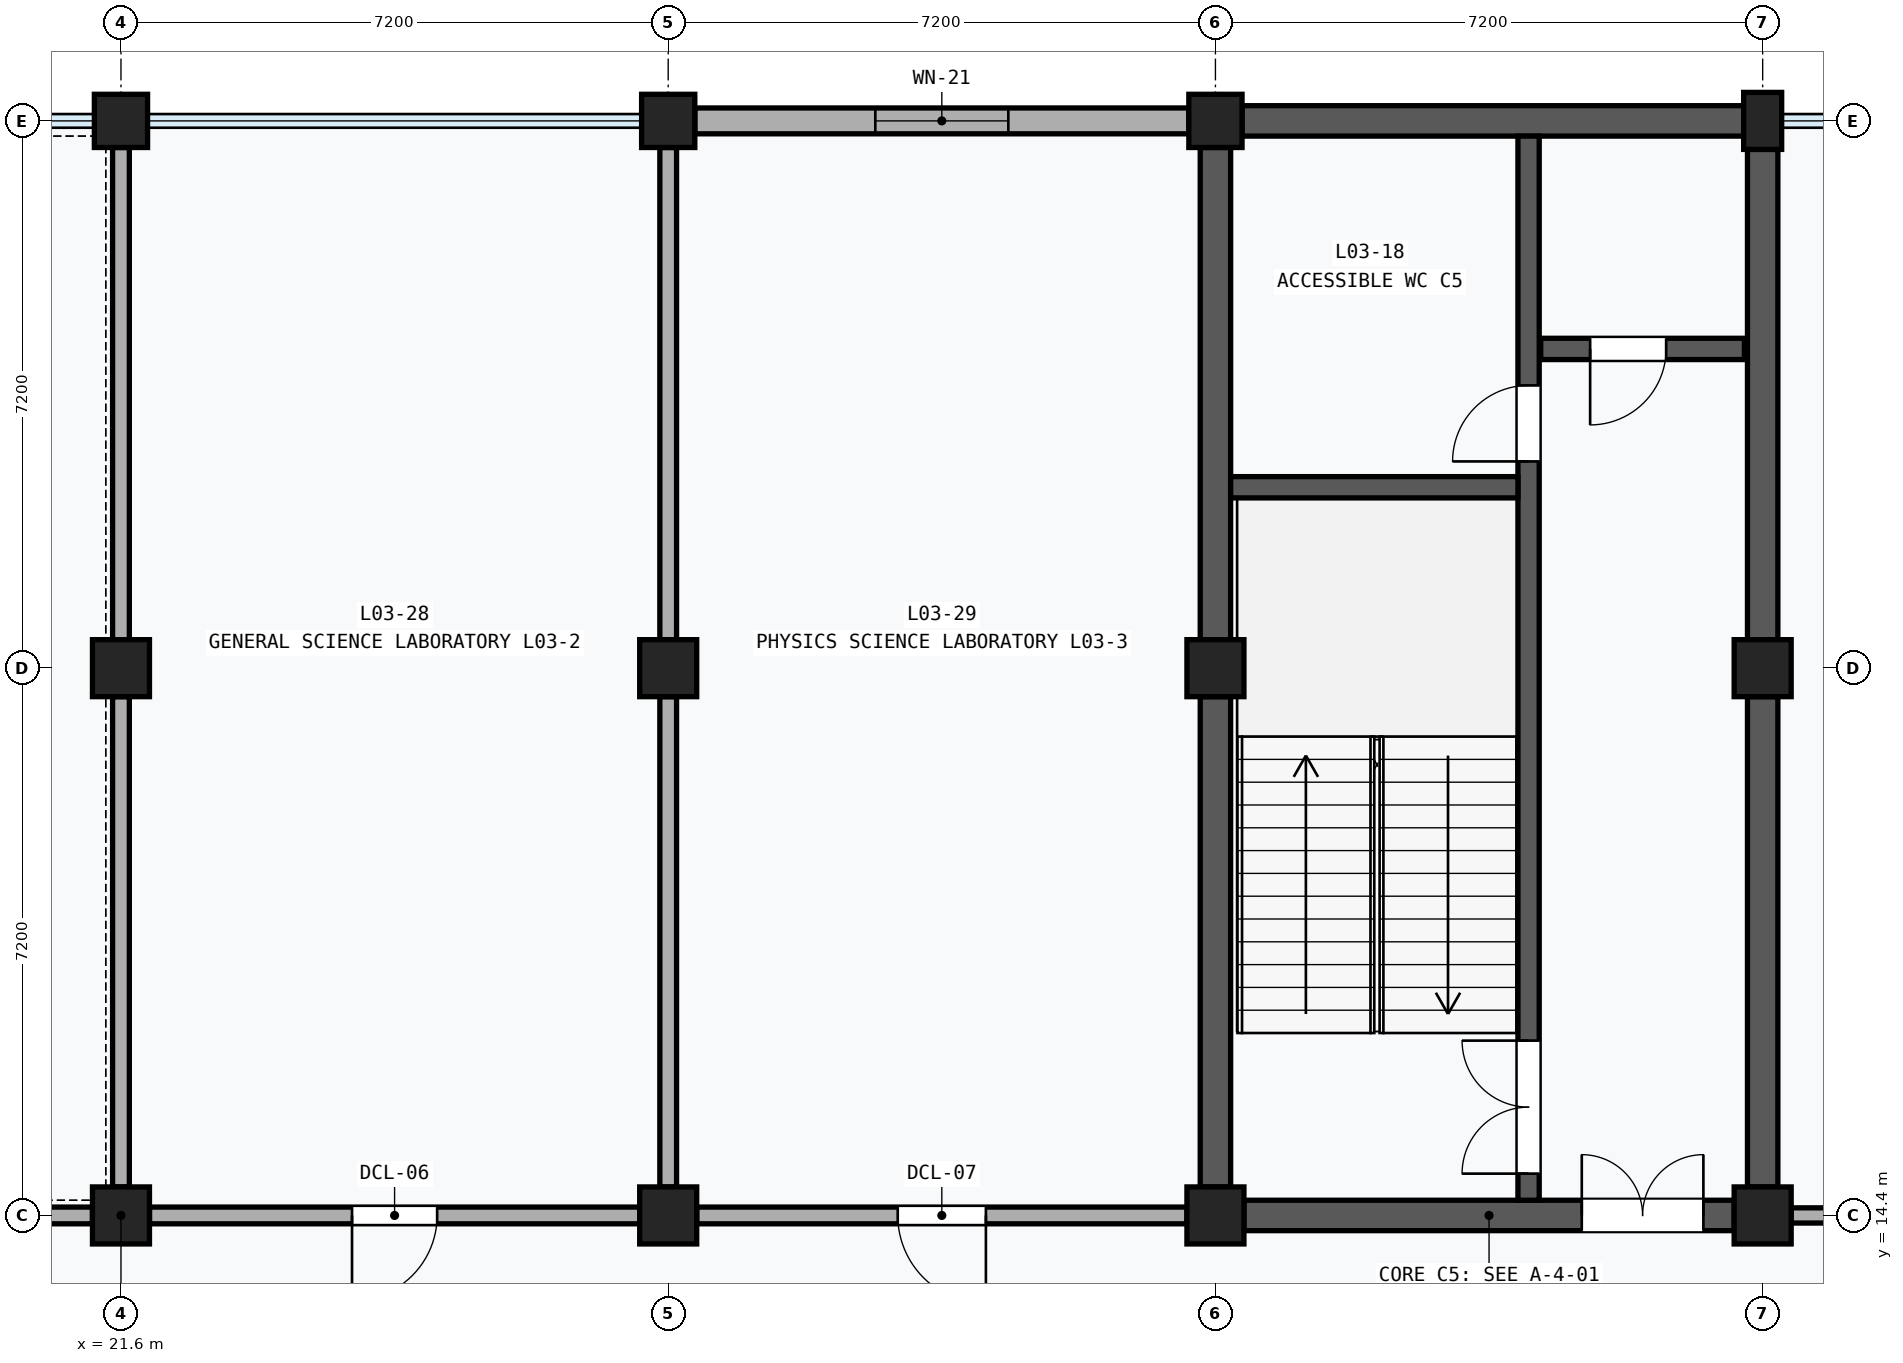
"""IFC4 building model, lengths in metres.
Left out: names, types, materials, properties, quantities, classifications, styles, units other than length and angle.
Written with IfcOpenShell. Run it as: python <this file> out.ifc"""

import sys

from ifc_helpers import new_model, si_unit, direction, frame, frame_2d, origin, origin_2d, place, context, subcontext, project, spatial, rectangle, extrude, element, fill, save


model = new_model("IFC4")
c1 = context("Model", 3, precision=1e-05, world=origin(), true_north=direction((0.0, 1.0)))
c2 = subcontext(c1, "Body", "Model", "MODEL_VIEW")
j1 = project(units=[si_unit("LENGTHUNIT", "METRE"), si_unit("PLANEANGLEUNIT", "RADIAN")], contexts=[c1])
p1 = place(None, origin())
s1 = spatial("IfcSite", under=j1, at=p1, CompositionType="ELEMENT")
p2 = place(p1, origin())
s2 = spatial("IfcBuilding", under=s1, at=p2, CompositionType="ELEMENT")
p3 = place(p2, frame((0.0, 0.0, 14.4)))
s3 = spatial("IfcBuildingStorey", under=s2, at=p3, CompositionType="ELEMENT", Elevation=14.4)
for number, where, z_axis, x_axis in (
    (1, (21.6, 14.4, 0.0), (0.0, 0.0, 1.0), (1.0, 0.0, 0.0)),
    (2, (21.6, 21.6, 0.0), (0.0, 0.0, 1.0), (1.0, 0.0, 0.0)),
):
    element("IfcColumn", number, at=place(p3, frame(where, z_axis=z_axis, x_axis=x_axis)), inside=s3, PredefinedType="COLUMN", context=c2, shape_type="SweptSolid", body=[
        extrude(rectangle(XDim=0.75, YDim=0.75, at=origin_2d()), origin(), (0.0, 0.0, 1.0), 4.2),
    ])
p4 = place(p3, frame((21.6, 28.8, 0.0), z_axis=(0.0, 0.0, 1.0), x_axis=(1.0, 0.0, 0.0)))
e3 = element("IfcColumn", 3, at=p4, inside=s3, PredefinedType="COLUMN", context=c2, shape_type="SweptSolid", body=[
    extrude(rectangle(XDim=0.7, YDim=0.7, at=origin_2d()), origin(), (0.0, 0.0, 1.0), 4.2),
])
for number, where, z_axis, x_axis in (
    (4, (28.8, 14.4, 0.0), (0.0, 0.0, 1.0), (1.0, 0.0, 0.0)),
    (5, (28.8, 21.6, 0.0), (0.0, 0.0, 1.0), (1.0, 0.0, 0.0)),
):
    element("IfcColumn", number, at=place(p3, frame(where, z_axis=z_axis, x_axis=x_axis)), inside=s3, PredefinedType="COLUMN", context=c2, shape_type="SweptSolid", body=[
        extrude(rectangle(XDim=0.75, YDim=0.75, at=origin_2d()), origin(), (0.0, 0.0, 1.0), 4.2),
    ])
p5 = place(p3, frame((28.8, 28.8, 0.0), z_axis=(0.0, 0.0, 1.0), x_axis=(1.0, 0.0, 0.0)))
e6 = element("IfcColumn", 6, at=p5, inside=s3, PredefinedType="COLUMN", context=c2, shape_type="SweptSolid", body=[
    extrude(rectangle(XDim=0.7, YDim=0.7, at=origin_2d()), origin(), (0.0, 0.0, 1.0), 4.2),
])
for number, where, z_axis, x_axis in (
    (7, (36.0, 14.4, 0.0), (0.0, 0.0, 1.0), (1.0, 0.0, 0.0)),
    (8, (36.0, 21.6, 0.0), (0.0, 0.0, 1.0), (1.0, 0.0, 0.0)),
):
    element("IfcColumn", number, at=place(p3, frame(where, z_axis=z_axis, x_axis=x_axis)), inside=s3, PredefinedType="COLUMN", context=c2, shape_type="SweptSolid", body=[
        extrude(rectangle(XDim=0.75, YDim=0.75, at=origin_2d()), origin(), (0.0, 0.0, 1.0), 4.2),
    ])
p6 = place(p3, frame((36.0, 28.8, 0.0), z_axis=(0.0, 0.0, 1.0), x_axis=(1.0, 0.0, 0.0)))
e9 = element("IfcColumn", 9, at=p6, inside=s3, PredefinedType="COLUMN", context=c2, shape_type="SweptSolid", body=[
    extrude(rectangle(XDim=0.7, YDim=0.7, at=origin_2d()), origin(), (0.0, 0.0, 1.0), 4.2),
])
for number, where, z_axis, x_axis in (
    (10, (43.2, 14.4, 0.0), (0.0, 0.0, 1.0), (1.0, 0.0, 0.0)),
    (11, (43.2, 21.6, 0.0), (0.0, 0.0, 1.0), (1.0, 0.0, 0.0)),
):
    element("IfcColumn", number, at=place(p3, frame(where, z_axis=z_axis, x_axis=x_axis)), inside=s3, PredefinedType="COLUMN", context=c2, shape_type="SweptSolid", body=[
        extrude(rectangle(XDim=0.75, YDim=0.75, at=origin_2d()), origin(), (0.0, 0.0, 1.0), 4.2),
    ])
p7 = place(p3, frame((43.2, 28.8, 0.0), z_axis=(0.0, 0.0, 1.0), x_axis=(1.0, 0.0, 0.0)))
e12 = element("IfcColumn", 12, at=p7, inside=s3, PredefinedType="PILASTER", context=c2, shape_type="SweptSolid", body=[
    extrude(rectangle(XDim=0.5, YDim=0.75, at=origin_2d()), origin(), (0.0, 0.0, 1.0), 4.2),
])
p8 = place(p3, frame((29.15, 28.8, 0.0), z_axis=(0.0, 0.0, 1.0), x_axis=(1.0, 0.0, 0.0)))
e13 = element("IfcWall", 13, at=p8, inside=s3, PredefinedType="SOLIDWALL", context=c2, shape_type="SweptSolid", body=[
    extrude(rectangle(XDim=6.5, YDim=0.34, at=frame_2d((3.25, 0.0))), origin(), (0.0, 0.0, 1.0), 3.31),
])
p9 = place(p8, frame((2.375, 0.0, 1.2)))
e14 = element("IfcOpeningElement", 14, at=p9, cuts=e13, PredefinedType="OPENING", context=c2, shape_type="SweptSolid", body=[
    extrude(rectangle(XDim=1.75, YDim=1.35, at=frame_2d((0.875, 0.675))), frame((0.0, 0.182, 0.0), z_axis=(0.0, -1.0, 0.0), x_axis=(1.0, 0.0, 0.0)), (0.0, 0.0, 1.0), 0.364),
])
p10 = place(p3, frame((36.0, 14.775, 0.0), z_axis=(0.0, 0.0, 1.0), x_axis=(0.0, 1.0, 0.0)))
e15 = element("IfcWall", 15, at=p10, inside=s3, PredefinedType="SHEAR", context=c2, shape_type="SweptSolid", body=[
    extrude(rectangle(XDim=6.45, YDim=0.4, at=frame_2d((3.225, 0.0))), origin(), (0.0, 0.0, 1.0), 3.17),
])
p11 = place(p3, frame((36.0, 21.975, 0.0), z_axis=(0.0, 0.0, 1.0), x_axis=(0.0, 1.0, 0.0)))
e16 = element("IfcWall", 16, at=p11, inside=s3, PredefinedType="SHEAR", context=c2, shape_type="SweptSolid", body=[
    extrude(rectangle(XDim=6.475, YDim=0.4, at=frame_2d((3.237, 0.0))), origin(), (0.0, 0.0, 1.0), 3.17),
])
p12 = place(p3, frame((43.2, 14.775, 0.0), z_axis=(0.0, 0.0, 1.0), x_axis=(0.0, 1.0, 0.0)))
e17 = element("IfcWall", 17, at=p12, inside=s3, PredefinedType="SHEAR", context=c2, shape_type="SweptSolid", body=[
    extrude(rectangle(XDim=6.45, YDim=0.4, at=frame_2d((3.225, 0.0))), origin(), (0.0, 0.0, 1.0), 3.17),
])
p13 = place(p3, frame((43.2, 21.975, 0.0), z_axis=(0.0, 0.0, 1.0), x_axis=(0.0, 1.0, 0.0)))
e18 = element("IfcWall", 18, at=p13, inside=s3, PredefinedType="SHEAR", context=c2, shape_type="SweptSolid", body=[
    extrude(rectangle(XDim=6.45, YDim=0.4, at=frame_2d((3.225, 0.0))), origin(), (0.0, 0.0, 1.0), 3.17),
])
p14 = place(p3, frame((36.375, 14.4, 0.0), z_axis=(0.0, 0.0, 1.0), x_axis=(1.0, 0.0, 0.0)))
e19 = element("IfcWall", 19, at=p14, inside=s3, PredefinedType="SHEAR", context=c2, shape_type="SweptSolid", body=[
    extrude(rectangle(XDim=6.45, YDim=0.4, at=frame_2d((3.225, 0.0))), origin(), (0.0, 0.0, 1.0), 3.17),
])
p15 = place(p14, frame((4.445, 0.0, 0.0)))
e20 = element("IfcOpeningElement", 20, at=p15, cuts=e19, PredefinedType="OPENING", context=c2, shape_type="SweptSolid", body=[
    extrude(rectangle(XDim=1.6, YDim=2.2, at=frame_2d((0.8, 1.1))), frame((0.0, 0.212, 0.0), z_axis=(0.0, -1.0, 0.0), x_axis=(1.0, 0.0, 0.0)), (0.0, 0.0, 1.0), 0.424),
])
p16 = place(p3, frame((36.35, 28.8, 0.0), z_axis=(0.0, 0.0, 1.0), x_axis=(1.0, 0.0, 0.0)))
e21 = element("IfcWall", 21, at=p16, inside=s3, PredefinedType="SHEAR", context=c2, shape_type="SweptSolid", body=[
    extrude(rectangle(XDim=6.6, YDim=0.4, at=frame_2d((3.3, 0.0))), origin(), (0.0, 0.0, 1.0), 3.31),
])
p17 = place(p3, frame((40.12, 14.6, 0.0), z_axis=(0.0, 0.0, 1.0), x_axis=(0.0, 1.0, 0.0)))
e22 = element("IfcWall", 22, at=p17, inside=s3, PredefinedType="SHEAR", context=c2, shape_type="SweptSolid", body=[
    extrude(rectangle(XDim=14.0, YDim=0.28, at=frame_2d((7.0, 0.0))), origin(), (0.0, 0.0, 1.0), 3.94),
])
p18 = place(p17, frame((0.35, 0.0, 0.0)))
e23 = element("IfcOpeningElement", 23, at=p18, cuts=e22, PredefinedType="OPENING", context=c2, shape_type="SweptSolid", body=[
    extrude(rectangle(XDim=1.75, YDim=2.15, at=frame_2d((0.875, 1.075))), frame((0.0, 0.152, 0.0), z_axis=(0.0, -1.0, 0.0), x_axis=(1.0, 0.0, 0.0)), (0.0, 0.0, 1.0), 0.304),
])
p19 = place(p17, frame((9.72, 0.0, 0.0)))
e24 = element("IfcOpeningElement", 24, at=p19, cuts=e22, PredefinedType="OPENING", context=c2, shape_type="SweptSolid", body=[
    extrude(rectangle(XDim=1.0, YDim=2.15, at=frame_2d((0.5, 1.075))), frame((0.0, 0.152, 0.0), z_axis=(0.0, -1.0, 0.0), x_axis=(1.0, 0.0, 0.0)), (0.0, 0.0, 1.0), 0.304),
])
p20 = place(p3, frame((36.2, 23.98, 0.0), z_axis=(0.0, 0.0, 1.0), x_axis=(1.0, 0.0, 0.0)))
e25 = element("IfcWall", 25, at=p20, inside=s3, PredefinedType="SHEAR", context=c2, shape_type="SweptSolid", body=[
    extrude(rectangle(XDim=3.78, YDim=0.28, at=frame_2d((1.89, 0.0))), origin(), (0.0, 0.0, 1.0), 3.94),
])
p21 = place(p3, frame((40.28, 25.8, 0.0), z_axis=(0.0, 0.0, 1.0), x_axis=(1.0, 0.0, 0.0)))
e26 = element("IfcWall", 26, at=p21, inside=s3, PredefinedType="SHEAR", context=c2, shape_type="SweptSolid", body=[
    extrude(rectangle(XDim=2.68, YDim=0.28, at=frame_2d((1.34, 0.0))), origin(), (0.0, 0.0, 1.0), 3.94),
])
p22 = place(p21, frame((0.65, 0.0, 0.0)))
e27 = element("IfcOpeningElement", 27, at=p22, cuts=e26, PredefinedType="OPENING", context=c2, shape_type="SweptSolid", body=[
    extrude(rectangle(XDim=1.0, YDim=2.15, at=frame_2d((0.5, 1.075))), frame((0.0, 0.152, 0.0), z_axis=(0.0, -1.0, 0.0), x_axis=(1.0, 0.0, 0.0)), (0.0, 0.0, 1.0), 0.304),
])
p23 = place(p3, frame((14.75, 14.4, 0.0), z_axis=(0.0, 0.0, 1.0), x_axis=(1.0, 0.0, 0.0)))
e28 = element("IfcWall", 28, at=p23, inside=s3, PredefinedType="PARTITIONING", context=c2, shape_type="SweptSolid", body=[
    extrude(rectangle(XDim=6.475, YDim=0.22, at=frame_2d((3.238, 0.0))), origin(), (0.0, 0.0, 1.0), 3.24),
])
p24 = place(p23, frame((2.698, 0.0, 0.0)))
e29 = element("IfcOpeningElement", 29, at=p24, cuts=e28, PredefinedType="OPENING", context=c2, shape_type="SweptSolid", body=[
    extrude(rectangle(XDim=1.08, YDim=2.18, at=frame_2d((0.54, 1.09))), frame((0.0, 0.122, 0.0), z_axis=(0.0, -1.0, 0.0), x_axis=(1.0, 0.0, 0.0)), (0.0, 0.0, 1.0), 0.244),
])
p25 = place(p3, frame((21.6, 14.775, 0.0), z_axis=(0.0, 0.0, 1.0), x_axis=(0.0, 1.0, 0.0)))
e30 = element("IfcWall", 30, at=p25, inside=s3, PredefinedType="PARTITIONING", context=c2, shape_type="SweptSolid", body=[
    extrude(rectangle(XDim=6.45, YDim=0.22, at=frame_2d((3.225, 0.0))), origin(), (0.0, 0.0, 1.0), 3.17),
])
p26 = place(p3, frame((21.6, 21.975, 0.0), z_axis=(0.0, 0.0, 1.0), x_axis=(0.0, 1.0, 0.0)))
e31 = element("IfcWall", 31, at=p26, inside=s3, PredefinedType="PARTITIONING", context=c2, shape_type="SweptSolid", body=[
    extrude(rectangle(XDim=6.475, YDim=0.22, at=frame_2d((3.237, 0.0))), origin(), (0.0, 0.0, 1.0), 3.17),
])
p27 = place(p3, frame((21.975, 14.4, 0.0), z_axis=(0.0, 0.0, 1.0), x_axis=(1.0, 0.0, 0.0)))
e32 = element("IfcWall", 32, at=p27, inside=s3, PredefinedType="PARTITIONING", context=c2, shape_type="SweptSolid", body=[
    extrude(rectangle(XDim=6.45, YDim=0.22, at=frame_2d((3.225, 0.0))), origin(), (0.0, 0.0, 1.0), 3.17),
])
p28 = place(p27, frame((2.665, 0.0, 0.0)))
e33 = element("IfcOpeningElement", 33, at=p28, cuts=e32, PredefinedType="OPENING", context=c2, shape_type="SweptSolid", body=[
    extrude(rectangle(XDim=1.12, YDim=2.2, at=frame_2d((0.56, 1.1))), frame((0.0, 0.122, 0.0), z_axis=(0.0, -1.0, 0.0), x_axis=(1.0, 0.0, 0.0)), (0.0, 0.0, 1.0), 0.244),
])
p29 = place(p3, frame((28.8, 14.775, 0.0), z_axis=(0.0, 0.0, 1.0), x_axis=(0.0, 1.0, 0.0)))
e34 = element("IfcWall", 34, at=p29, inside=s3, PredefinedType="PARTITIONING", context=c2, shape_type="SweptSolid", body=[
    extrude(rectangle(XDim=6.45, YDim=0.22, at=frame_2d((3.225, 0.0))), origin(), (0.0, 0.0, 1.0), 3.17),
])
p30 = place(p3, frame((28.8, 21.975, 0.0), z_axis=(0.0, 0.0, 1.0), x_axis=(0.0, 1.0, 0.0)))
e35 = element("IfcWall", 35, at=p30, inside=s3, PredefinedType="PARTITIONING", context=c2, shape_type="SweptSolid", body=[
    extrude(rectangle(XDim=6.475, YDim=0.22, at=frame_2d((3.237, 0.0))), origin(), (0.0, 0.0, 1.0), 3.17),
])
p31 = place(p3, frame((29.175, 14.4, 0.0), z_axis=(0.0, 0.0, 1.0), x_axis=(1.0, 0.0, 0.0)))
e36 = element("IfcWall", 36, at=p31, inside=s3, PredefinedType="PARTITIONING", context=c2, shape_type="SweptSolid", body=[
    extrude(rectangle(XDim=6.45, YDim=0.22, at=frame_2d((3.225, 0.0))), origin(), (0.0, 0.0, 1.0), 3.17),
])
p32 = place(p31, frame((2.645, 0.0, 0.0)))
e37 = element("IfcOpeningElement", 37, at=p32, cuts=e36, PredefinedType="OPENING", context=c2, shape_type="SweptSolid", body=[
    extrude(rectangle(XDim=1.16, YDim=2.22, at=frame_2d((0.58, 1.11))), frame((0.0, 0.122, 0.0), z_axis=(0.0, -1.0, 0.0), x_axis=(1.0, 0.0, 0.0)), (0.0, 0.0, 1.0), 0.244),
])
p33 = place(p3, frame((43.575, 14.4, 0.0), z_axis=(0.0, 0.0, 1.0), x_axis=(1.0, 0.0, 0.0)))
e38 = element("IfcWall", 38, at=p33, inside=s3, PredefinedType="PARTITIONING", context=c2, shape_type="SweptSolid", body=[
    extrude(rectangle(XDim=6.45, YDim=0.2, at=frame_2d((3.225, 0.0))), origin(), (0.0, 0.0, 1.0), 3.24),
])
p34 = place(p33, frame((2.625, 0.0, 0.0)))
e39 = element("IfcOpeningElement", 39, at=p34, cuts=e38, PredefinedType="OPENING", context=c2, shape_type="SweptSolid", body=[
    extrude(rectangle(XDim=1.2, YDim=2.24, at=frame_2d((0.6, 1.12))), frame((0.0, 0.112, 0.0), z_axis=(0.0, -1.0, 0.0), x_axis=(1.0, 0.0, 0.0)), (0.0, 0.0, 1.0), 0.224),
])
p35 = place(p9, origin())
e40 = element("IfcWindow", 40, at=p35, inside=s3, PartitioningType="SINGLE_PANEL", PredefinedType="WINDOW", context=c2, shape_type="SweptSolid", body=[
    extrude(rectangle(XDim=1.75, YDim=1.35, at=frame_2d((0.875, 0.675))), frame((0.0, 0.03, 0.0), z_axis=(0.0, -1.0, 0.0), x_axis=(1.0, 0.0, 0.0)), (0.0, 0.0, 1.0), 0.06),
])
fill(e14, e40)
p36 = place(p15, origin())
e41 = element("IfcDoor", 41, at=p36, inside=s3, OperationType="DOUBLE_DOOR_SINGLE_SWING", PredefinedType="DOOR", context=c2, shape_type="SweptSolid", body=[
    extrude(rectangle(XDim=1.6, YDim=2.2, at=frame_2d((0.8, 1.1))), frame((0.0, 0.025, 0.0), z_axis=(0.0, -1.0, 0.0), x_axis=(1.0, 0.0, 0.0)), (0.0, 0.0, 1.0), 0.05),
])
fill(e20, e41)
p37 = place(p18, origin())
e42 = element("IfcDoor", 42, at=p37, inside=s3, OperationType="DOUBLE_DOOR_SINGLE_SWING", PredefinedType="DOOR", context=c2, shape_type="SweptSolid", body=[
    extrude(rectangle(XDim=1.75, YDim=2.15, at=frame_2d((0.875, 1.075))), frame((0.0, 0.025, 0.0), z_axis=(0.0, -1.0, 0.0), x_axis=(1.0, 0.0, 0.0)), (0.0, 0.0, 1.0), 0.05),
])
fill(e23, e42)
p38 = place(p19, origin())
e43 = element("IfcDoor", 43, at=p38, inside=s3, OperationType="SINGLE_SWING_LEFT", PredefinedType="DOOR", context=c2, shape_type="SweptSolid", body=[
    extrude(rectangle(XDim=1.0, YDim=2.15, at=frame_2d((0.5, 1.075))), frame((0.0, 0.025, 0.0), z_axis=(0.0, -1.0, 0.0), x_axis=(1.0, 0.0, 0.0)), (0.0, 0.0, 1.0), 0.05),
])
fill(e24, e43)
p39 = place(p22, frame((1.0, 0.0, 0.0), z_axis=(0.0, 0.0, 1.0), x_axis=(-1.0, 0.0, 0.0)))
e44 = element("IfcDoor", 44, at=p39, inside=s3, OperationType="SINGLE_SWING_RIGHT", PredefinedType="DOOR", context=c2, shape_type="SweptSolid", body=[
    extrude(rectangle(XDim=1.0, YDim=2.15, at=frame_2d((0.5, 1.075))), frame((0.0, 0.025, 0.0), z_axis=(0.0, -1.0, 0.0), x_axis=(1.0, 0.0, 0.0)), (0.0, 0.0, 1.0), 0.05),
])
fill(e27, e44)
p40 = place(p28, frame((1.12, 0.0, 0.0), z_axis=(0.0, 0.0, 1.0), x_axis=(-1.0, 0.0, 0.0)))
e45 = element("IfcDoor", 45, at=p40, inside=s3, OperationType="SINGLE_SWING_RIGHT", PredefinedType="DOOR", context=c2, shape_type="SweptSolid", body=[
    extrude(rectangle(XDim=1.12, YDim=2.2, at=frame_2d((0.56, 1.1))), frame((0.0, 0.025, 0.0), z_axis=(0.0, -1.0, 0.0), x_axis=(1.0, 0.0, 0.0)), (0.0, 0.0, 1.0), 0.05),
])
fill(e33, e45)
p41 = place(p32, frame((1.16, 0.0, 0.0), z_axis=(0.0, 0.0, 1.0), x_axis=(-1.0, 0.0, 0.0)))
e46 = element("IfcDoor", 46, at=p41, inside=s3, OperationType="SINGLE_SWING_LEFT", PredefinedType="DOOR", context=c2, shape_type="SweptSolid", body=[
    extrude(rectangle(XDim=1.16, YDim=2.22, at=frame_2d((0.58, 1.11))), frame((0.0, 0.025, 0.0), z_axis=(0.0, -1.0, 0.0), x_axis=(1.0, 0.0, 0.0)), (0.0, 0.0, 1.0), 0.05),
])
fill(e37, e46)
save(model, sys.argv[1])
